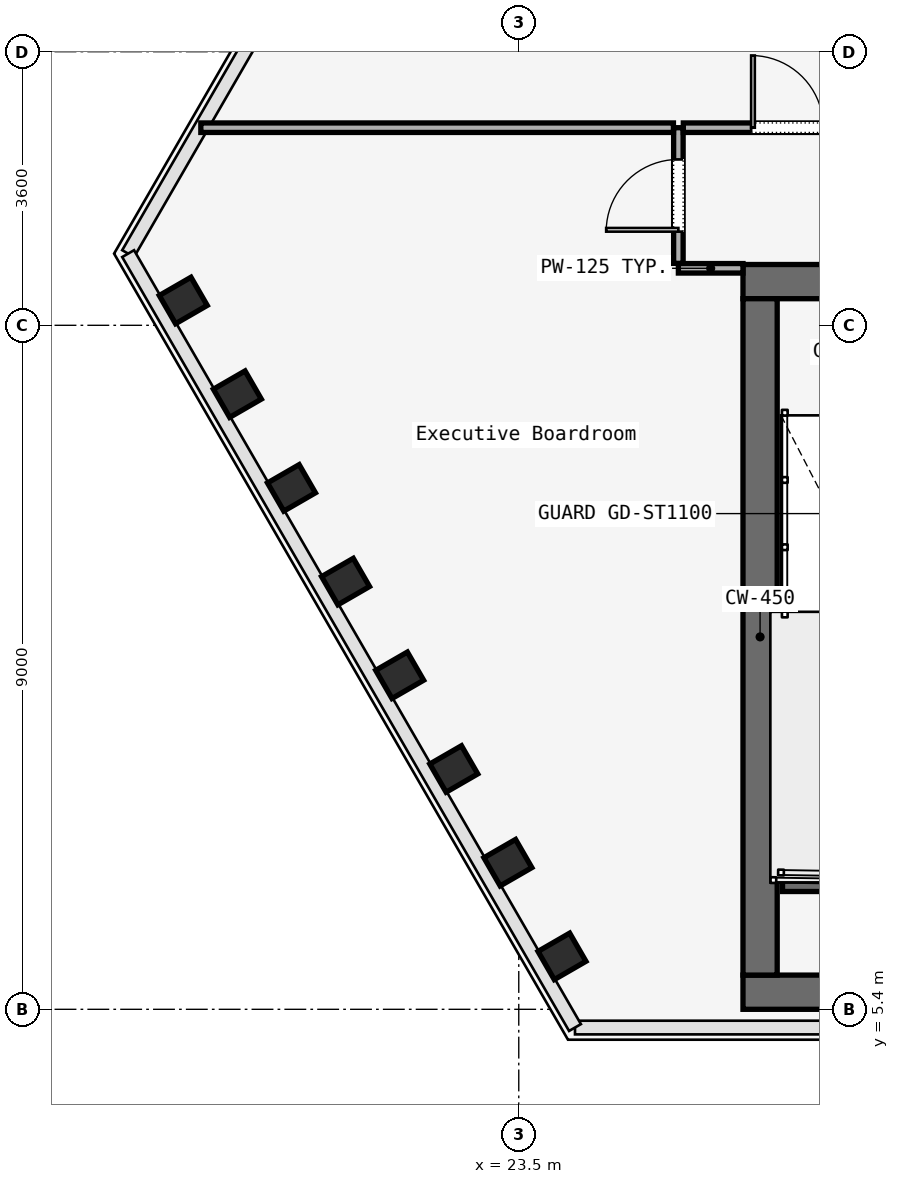
"""IFC4 building model, lengths in metres.
Left out: names, types, materials, properties, quantities, classifications, styles, units other than length and angle.
Written with IfcOpenShell. Run it as: python <this file> out.ifc"""

import sys

from ifc_helpers import new_model, si_unit, direction, frame, frame_2d, origin, origin_2d, place, context, subcontext, project, spatial, rectangle, i_section, extrude, element, fill, save


model = new_model("IFC4")
c1 = context("Model", 3, precision=1e-05, world=origin(), true_north=direction((0.0, 1.0)))
c2 = subcontext(c1, "Body", "Model", "MODEL_VIEW")
j1 = project(units=[si_unit("LENGTHUNIT", "METRE"), si_unit("PLANEANGLEUNIT", "RADIAN")], contexts=[c1])
p1 = place(None, origin())
s1 = spatial("IfcSite", under=j1, at=p1, CompositionType="ELEMENT")
p2 = place(p1, origin())
s2 = spatial("IfcBuilding", under=s1, at=p2, CompositionType="ELEMENT")
p3 = place(p2, frame((0.0, 0.0, 146.0)))
s3 = spatial("IfcBuildingStorey", under=s2, at=p3, CompositionType="ELEMENT", Elevation=146.0)
p4 = place(p3, frame((26.45, 14.975, 0.0), z_axis=(0.0, 0.0, 1.0), x_axis=(1.0, 0.0, 0.0)))
e1 = element("IfcWall", 1, at=p4, inside=s3, PredefinedType="SOLIDWALL", context=c2, shape_type="SweptSolid", body=[
    extrude(rectangle(XDim=31.1, YDim=0.45, at=frame_2d((15.55, 0.0))), origin(), (0.0, 0.0, 1.0), 3.58),
])
p5 = place(p4, frame((1.65, 0.0, 0.0)))
e2 = element("IfcOpeningElement", 2, at=p5, cuts=e1, PredefinedType="OPENING", context=c2, shape_type="SweptSolid", body=[
    extrude(rectangle(XDim=1.1, YDim=2.2, at=frame_2d((0.55, 1.1))), frame((0.0, 0.225, 0.0), z_axis=(0.0, -1.0, 0.0), x_axis=(1.0, 0.0, 0.0)), (0.0, 0.0, 1.0), 0.45),
])
p6 = place(p4, frame((13.65, 0.0, 0.0)))
e3 = element("IfcOpeningElement", 3, at=p6, cuts=e1, PredefinedType="OPENING", context=c2, shape_type="SweptSolid", body=[
    extrude(rectangle(XDim=1.1, YDim=2.2, at=frame_2d((0.55, 1.1))), frame((0.0, 0.225, 0.0), z_axis=(0.0, -1.0, 0.0), x_axis=(1.0, 0.0, 0.0)), (0.0, 0.0, 1.0), 0.45),
])
p7 = place(p4, frame((25.55, 0.0, 0.0)))
e4 = element("IfcOpeningElement", 4, at=p7, cuts=e1, PredefinedType="OPENING", context=c2, shape_type="SweptSolid", body=[
    extrude(rectangle(XDim=1.1, YDim=2.2, at=frame_2d((0.55, 1.1))), frame((0.0, 0.225, 0.0), z_axis=(0.0, -1.0, 0.0), x_axis=(1.0, 0.0, 0.0)), (0.0, 0.0, 1.0), 0.45),
])
p8 = place(p4, frame((10.7, 0.0, 0.0)))
e5 = element("IfcOpeningElement", 5, at=p8, cuts=e1, PredefinedType="OPENING", context=c2, shape_type="SweptSolid", body=[
    extrude(rectangle(XDim=1.4, YDim=2.2, at=frame_2d((0.7, 1.1))), frame((0.0, 0.225, 0.0), z_axis=(0.0, -1.0, 0.0), x_axis=(1.0, 0.0, 0.0)), (0.0, 0.0, 1.0), 0.45),
])
p9 = place(p4, frame((19.35, 0.0, 0.0)))
e6 = element("IfcOpeningElement", 6, at=p9, cuts=e1, PredefinedType="OPENING", context=c2, shape_type="SweptSolid", body=[
    extrude(rectangle(XDim=1.1, YDim=2.2, at=frame_2d((0.55, 1.1))), frame((0.0, 0.225, 0.0), z_axis=(0.0, -1.0, 0.0), x_axis=(1.0, 0.0, 0.0)), (0.0, 0.0, 1.0), 0.45),
])
p10 = place(p4, frame((21.4, 0.0, 0.0)))
e7 = element("IfcOpeningElement", 7, at=p10, cuts=e1, PredefinedType="OPENING", context=c2, shape_type="SweptSolid", body=[
    extrude(rectangle(XDim=0.9, YDim=2.1, at=frame_2d((0.45, 1.05))), frame((0.0, 0.225, 0.0), z_axis=(0.0, -1.0, 0.0), x_axis=(1.0, 0.0, 0.0)), (0.0, 0.0, 1.0), 0.45),
])
p11 = place(p4, frame((23.35, 0.0, 0.0)))
e8 = element("IfcOpeningElement", 8, at=p11, cuts=e1, PredefinedType="OPENING", context=c2, shape_type="SweptSolid", body=[
    extrude(rectangle(XDim=1.3, YDim=2.3, at=frame_2d((0.65, 1.15))), frame((0.0, 0.225, 0.0), z_axis=(0.0, -1.0, 0.0), x_axis=(1.0, 0.0, 0.0)), (0.0, 0.0, 1.0), 0.45),
])
p12 = place(p3, frame((26.45, 5.625, 0.0), z_axis=(0.0, 0.0, 1.0), x_axis=(1.0, 0.0, 0.0)))
e9 = element("IfcWall", 9, at=p12, inside=s3, PredefinedType="SOLIDWALL", context=c2, shape_type="SweptSolid", body=[
    extrude(rectangle(XDim=31.1, YDim=0.45, at=frame_2d((15.55, 0.0))), origin(), (0.0, 0.0, 1.0), 3.58),
])
p13 = place(p3, frame((26.675, 5.85, 0.0), z_axis=(0.0, 0.0, 1.0), x_axis=(0.0, 1.0, 0.0)))
e10 = element("IfcWall", 10, at=p13, inside=s3, PredefinedType="SOLIDWALL", context=c2, shape_type="SweptSolid", body=[
    extrude(rectangle(XDim=8.9, YDim=0.45, at=frame_2d((4.45, 0.0))), origin(), (0.0, 0.0, 1.0), 3.58),
])
p14 = place(p3, frame((19.086, 14.727, 0.0), z_axis=(-0.012779481275, -0.129282371416, 0.991525467802), x_axis=(-0.413106039492, 0.903706514921, 0.112507488752)))
e11 = element("IfcColumn", 11, at=p14, inside=s3, PredefinedType="COLUMN", context=c2, shape_type="SweptSolid", body=[
    extrude(i_section(OverallWidth=0.428, OverallDepth=0.481, WebThickness=0.051, FlangeThickness=0.065, FilletRadius=0.015, at=origin_2d()), origin(), (0.0, 0.0, 1.0), 3.611),
])
p15 = place(p3, frame((19.798, 13.494, 0.0), z_axis=(-0.022762459803, -0.112254154445, 0.993418781398), x_axis=(-0.319053107814, 0.942531575503, 0.099193465383)))
e12 = element("IfcColumn", 12, at=p15, inside=s3, PredefinedType="COLUMN", context=c2, shape_type="SweptSolid", body=[
    extrude(i_section(OverallWidth=0.428, OverallDepth=0.481, WebThickness=0.051, FlangeThickness=0.065, FilletRadius=0.015, at=origin_2d()), origin(), (0.0, 0.0, 1.0), 3.604),
])
p16 = place(p3, frame((20.51, 12.261, 0.0), z_axis=(-0.032770679105, -0.095123172061, 0.99492595942), x_axis=(-0.192082129751, 0.977503301261, 0.087130657372)))
e13 = element("IfcColumn", 13, at=p16, inside=s3, PredefinedType="COLUMN", context=c2, shape_type="SweptSolid", body=[
    extrude(i_section(OverallWidth=0.428, OverallDepth=0.481, WebThickness=0.051, FlangeThickness=0.065, FilletRadius=0.015, at=origin_2d()), origin(), (0.0, 0.0, 1.0), 3.598),
])
p17 = place(p3, frame((21.221, 11.028, 0.0), z_axis=(-0.042792297072, -0.077909150383, 0.996041657561), x_axis=(-0.022973401155, 0.996768007381, 0.076978973114)))
e14 = element("IfcColumn", 14, at=p17, inside=s3, PredefinedType="COLUMN", context=c2, shape_type="SweptSolid", body=[
    extrude(i_section(OverallWidth=0.428, OverallDepth=0.481, WebThickness=0.051, FlangeThickness=0.065, FilletRadius=0.015, at=origin_2d()), origin(), (0.0, 0.0, 1.0), 3.594),
])
p18 = place(p3, frame((21.933, 9.795, 0.0), z_axis=(-0.05281532937, -0.06063227001, 0.996761891736), x_axis=(0.189966625572, 0.979317815003, 0.069636903918)))
e15 = element("IfcColumn", 15, at=p18, inside=s3, PredefinedType="COLUMN", context=c2, shape_type="SweptSolid", body=[
    extrude(i_section(OverallWidth=0.428, OverallDepth=0.481, WebThickness=0.051, FlangeThickness=0.065, FilletRadius=0.015, at=origin_2d()), origin(), (0.0, 0.0, 1.0), 3.592),
])
p19 = place(p3, frame((22.645, 8.562, 0.0), z_axis=(-0.06289544663, -0.043312864328, 0.99707981555), x_axis=(0.427590176729, 0.901550198102, 0.0661353239)))
e16 = element("IfcColumn", 16, at=p19, inside=s3, PredefinedType="COLUMN", context=c2, shape_type="SweptSolid", body=[
    extrude(i_section(OverallWidth=0.428, OverallDepth=0.481, WebThickness=0.051, FlangeThickness=0.065, FilletRadius=0.015, at=origin_2d()), origin(), (0.0, 0.0, 1.0), 3.591),
])
p20 = place(p3, frame((23.357, 7.329, 0.0), z_axis=(-0.0728174138, -0.025972224156, 0.99700705505), x_axis=(0.645278448481, 0.76100790061, 0.066952962108)))
e17 = element("IfcColumn", 17, at=p20, inside=s3, PredefinedType="COLUMN", context=c2, shape_type="SweptSolid", body=[
    extrude(i_section(OverallWidth=0.428, OverallDepth=0.481, WebThickness=0.051, FlangeThickness=0.065, FilletRadius=0.015, at=origin_2d()), origin(), (0.0, 0.0, 1.0), 3.591),
])
p21 = place(p3, frame((24.069, 6.096, 0.0), z_axis=(-0.082839870593, -0.008698526198, 0.996524907607), x_axis=(0.806082141971, 0.587390840077, 0.072135853696)))
e18 = element("IfcColumn", 18, at=p21, inside=s3, PredefinedType="COLUMN", context=c2, shape_type="SweptSolid", body=[
    extrude(i_section(OverallWidth=0.428, OverallDepth=0.481, WebThickness=0.051, FlangeThickness=0.065, FilletRadius=0.015, at=origin_2d()), origin(), (0.0, 0.0, 1.0), 3.593),
])
p22 = place(p3, frame((26.97, 7.05, 0.0), z_axis=(0.0, 0.0, 1.0), x_axis=(1.0, 0.0, 0.0)))
e19 = element("IfcWall", 19, at=p22, inside=s3, PredefinedType="SOLIDWALL", context=c2, shape_type="SweptSolid", body=[
    extrude(rectangle(XDim=3.115, YDim=0.2, at=frame_2d((1.558, 0.0))), origin(), (0.0, 0.0, 1.0), 3.8),
])
p23 = place(p3, frame((26.45, 15.15, 0.0), z_axis=(0.0, 0.0, 1.0), x_axis=(-1.0, 0.0, 0.0)))
e20 = element("IfcWall", 20, at=p23, inside=s3, PredefinedType="PARTITIONING", context=c2, shape_type="SweptSolid", body=[
    extrude(rectangle(XDim=0.85, YDim=0.125, at=frame_2d((0.425, 0.0))), origin(), (0.0, 0.0, 1.0), 3.01),
])
p24 = place(p3, frame((25.6, 15.215, 0.0), z_axis=(0.0, 0.0, 1.0), x_axis=(0.0, 1.0, 0.0)))
e21 = element("IfcWall", 21, at=p24, inside=s3, PredefinedType="PARTITIONING", context=c2, shape_type="SweptSolid", body=[
    extrude(rectangle(XDim=1.785, YDim=0.125, at=frame_2d((0.893, 0.0))), origin(), (0.0, 0.0, 1.0), 3.01),
])
p25 = place(p24, frame((0.417, 0.0, 0.0)))
e22 = element("IfcOpeningElement", 22, at=p25, cuts=e21, PredefinedType="OPENING", context=c2, shape_type="SweptSolid", body=[
    extrude(rectangle(XDim=0.95, YDim=2.2, at=frame_2d((0.475, 1.1))), frame((0.0, 0.062, 0.0), z_axis=(0.0, -1.0, 0.0), x_axis=(1.0, 0.0, 0.0)), (0.0, 0.0, 1.0), 0.125),
])
p26 = place(p3, frame((25.665, 17.0, 0.0), z_axis=(0.0, 0.0, 1.0), x_axis=(1.0, 0.0, 0.0)))
e23 = element("IfcWall", 23, at=p26, inside=s3, PredefinedType="PARTITIONING", context=c2, shape_type="SweptSolid", body=[
    extrude(rectangle(XDim=2.735, YDim=0.125, at=frame_2d((1.367, 0.0))), origin(), (0.0, 0.0, 1.0), 3.01),
])
p27 = place(p26, frame((0.893, 0.0, 0.0)))
e24 = element("IfcOpeningElement", 24, at=p27, cuts=e23, PredefinedType="OPENING", context=c2, shape_type="SweptSolid", body=[
    extrude(rectangle(XDim=0.95, YDim=2.2, at=frame_2d((0.475, 1.1))), frame((0.0, 0.062, 0.0), z_axis=(0.0, -1.0, 0.0), x_axis=(1.0, 0.0, 0.0)), (0.0, 0.0, 1.0), 0.125),
])
p28 = place(p3, frame((19.317, 17.0, 0.0), z_axis=(0.0, 0.0, 1.0), x_axis=(1.0, 0.0, 0.0)))
e25 = element("IfcWall", 25, at=p28, inside=s3, PredefinedType="PARTITIONING", context=c2, shape_type="SweptSolid", body=[
    extrude(rectangle(XDim=6.218, YDim=0.125, at=frame_2d((3.109, 0.0))), origin(), (0.0, 0.0, 1.0), 3.01),
])
p29 = place(p25, origin())
e26 = element("IfcDoor", 26, at=p29, inside=s3, OperationType="SINGLE_SWING_LEFT", PredefinedType="DOOR", context=c2, shape_type="SweptSolid", body=[
    extrude(rectangle(XDim=0.95, YDim=2.2, at=frame_2d((0.475, 1.1))), frame((0.0, 0.025, 0.0), z_axis=(0.0, -1.0, 0.0), x_axis=(1.0, 0.0, 0.0)), (0.0, 0.0, 1.0), 0.05),
])
fill(e22, e26)
p30 = place(p27, origin())
e27 = element("IfcDoor", 27, at=p30, inside=s3, OperationType="SINGLE_SWING_LEFT", PredefinedType="DOOR", context=c2, shape_type="SweptSolid", body=[
    extrude(rectangle(XDim=0.95, YDim=2.2, at=frame_2d((0.475, 1.1))), frame((0.0, 0.025, 0.0), z_axis=(0.0, -1.0, 0.0), x_axis=(1.0, 0.0, 0.0)), (0.0, 0.0, 1.0), 0.05),
])
fill(e24, e27)
save(model, sys.argv[1])
